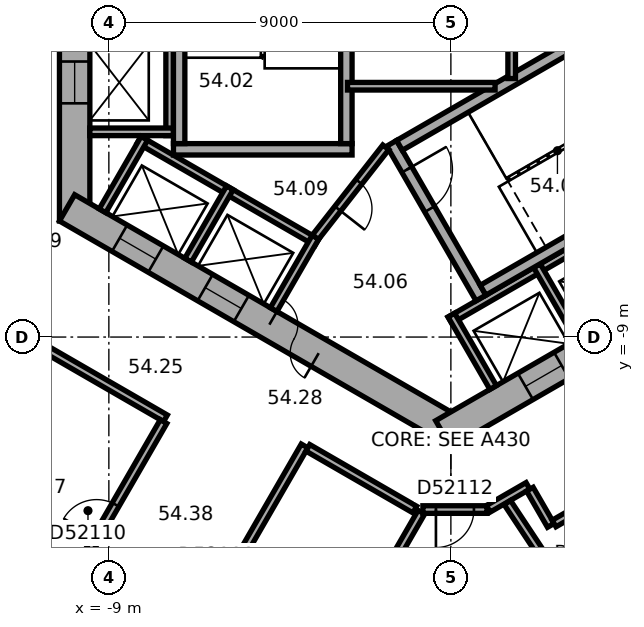
"""IFC4 building model, lengths in metres.
Left out: names, types, materials, properties, quantities, classifications, styles, units other than length and angle.
Written with IfcOpenShell. Run it as: python <this file> out.ifc"""

import sys

from ifc_helpers import new_model, si_unit, direction, frame, frame_2d, origin, place, context, subcontext, project, spatial, rectangle, extrude, element, fill, save


model = new_model("IFC4")
c1 = context("Model", 3, precision=1e-05, world=origin(), true_north=direction((0.0, 1.0)))
c2 = subcontext(c1, "Body", "Model", "MODEL_VIEW")
j1 = project(units=[si_unit("LENGTHUNIT", "METRE"), si_unit("PLANEANGLEUNIT", "RADIAN")], contexts=[c1])
p1 = place(None, origin())
s1 = spatial("IfcSite", under=j1, at=p1, CompositionType="ELEMENT")
p2 = place(p1, origin())
s2 = spatial("IfcBuilding", under=s1, at=p2, CompositionType="ELEMENT")
p3 = place(p2, frame((0.0, 0.0, 221.7)))
s3 = spatial("IfcBuildingStorey", under=s2, at=p3, CompositionType="ELEMENT", Elevation=221.7)
p4 = place(p3, frame((-9.9, 5.947, 0.0), z_axis=(0.0, 0.0, 1.0), x_axis=(0.0, -1.0, 0.0)))
e1 = element("IfcWall", 1, at=p4, inside=s3, PredefinedType="SHEAR", context=c2, shape_type="SweptSolid", body=[
    extrude(rectangle(XDim=11.894, YDim=0.8, at=frame_2d((5.947, 0.0))), origin(), (0.0, 0.0, 1.0), 3.7),
])
p5 = place(p4, frame((5.097, 0.0, 0.0)))
e2 = element("IfcOpeningElement", 2, at=p5, cuts=e1, PredefinedType="OPENING", context=c2, shape_type="SweptSolid", body=[
    extrude(rectangle(XDim=1.1, YDim=2.1, at=frame_2d((0.55, 1.05))), frame((0.0, 0.41, 0.0), z_axis=(0.0, -1.0, 0.0), x_axis=(1.0, 0.0, 0.0)), (0.0, 0.0, 1.0), 0.82),
])
p6 = place(p4, frame((7.697, 0.0, 0.0)))
e3 = element("IfcOpeningElement", 3, at=p6, cuts=e1, PredefinedType="OPENING", context=c2, shape_type="SweptSolid", body=[
    extrude(rectangle(XDim=1.1, YDim=2.1, at=frame_2d((0.55, 1.05))), frame((0.0, 0.41, 0.0), z_axis=(0.0, -1.0, 0.0), x_axis=(1.0, 0.0, 0.0)), (0.0, 0.0, 1.0), 0.82),
])
p7 = place(p3, frame((-10.1, -5.6, 0.0), z_axis=(0.0, 0.0, 1.0), x_axis=(0.866023897231, -0.500002609418, 0.0)))
e4 = element("IfcWall", 4, at=p7, inside=s3, PredefinedType="SHEAR", context=c2, shape_type="SweptSolid", body=[
    extrude(rectangle(XDim=11.894, YDim=0.8, at=frame_2d((5.947, 0.0))), origin(), (0.0, 0.0, 1.0), 3.7),
])
p8 = place(p7, frame((6.147, 0.0, 0.0)))
e5 = element("IfcOpeningElement", 5, at=p8, cuts=e4, PredefinedType="OPENING", context=c2, shape_type="SweptSolid", body=[
    extrude(rectangle(XDim=1.5, YDim=2.1, at=frame_2d((0.75, 1.05))), frame((0.0, 0.41, 0.0), z_axis=(0.0, -1.0, 0.0), x_axis=(1.0, 0.0, 0.0)), (0.0, 0.0, 1.0), 0.82),
])
p9 = place(p7, frame((1.597, 0.0, 0.0)))
e6 = element("IfcOpeningElement", 6, at=p9, cuts=e4, PredefinedType="OPENING", context=c2, shape_type="SweptSolid", body=[
    extrude(rectangle(XDim=1.1, YDim=2.1, at=frame_2d((0.55, 1.05))), frame((0.0, 0.41, 0.0), z_axis=(0.0, -1.0, 0.0), x_axis=(1.0, 0.0, 0.0)), (0.0, 0.0, 1.0), 0.82),
])
p10 = place(p7, frame((4.197, 0.0, 0.0)))
e7 = element("IfcOpeningElement", 7, at=p10, cuts=e4, PredefinedType="OPENING", context=c2, shape_type="SweptSolid", body=[
    extrude(rectangle(XDim=1.1, YDim=2.1, at=frame_2d((0.55, 1.05))), frame((0.0, 0.41, 0.0), z_axis=(0.0, -1.0, 0.0), x_axis=(1.0, 0.0, 0.0)), (0.0, 0.0, 1.0), 0.82),
])
p11 = place(p3, frame((-0.2, -11.547, 0.0), z_axis=(0.0, 0.0, 1.0), x_axis=(0.866023897231, 0.500002609418, 0.0)))
e8 = element("IfcWall", 8, at=p11, inside=s3, PredefinedType="SHEAR", context=c2, shape_type="SweptSolid", body=[
    extrude(rectangle(XDim=11.894, YDim=0.8, at=frame_2d((5.947, 0.0))), origin(), (0.0, 0.0, 1.0), 3.7),
])
p12 = place(p11, frame((2.497, 0.0, 0.0)))
e9 = element("IfcOpeningElement", 9, at=p12, cuts=e8, PredefinedType="OPENING", context=c2, shape_type="SweptSolid", body=[
    extrude(rectangle(XDim=1.1, YDim=2.1, at=frame_2d((0.55, 1.05))), frame((0.0, 0.41, 0.0), z_axis=(0.0, -1.0, 0.0), x_axis=(1.0, 0.0, 0.0)), (0.0, 0.0, 1.0), 0.82),
])
p13 = place(p11, frame((5.097, 0.0, 0.0)))
e10 = element("IfcOpeningElement", 10, at=p13, cuts=e8, PredefinedType="OPENING", context=c2, shape_type="SweptSolid", body=[
    extrude(rectangle(XDim=1.1, YDim=2.1, at=frame_2d((0.55, 1.05))), frame((0.0, 0.41, 0.0), z_axis=(0.0, -1.0, 0.0), x_axis=(1.0, 0.0, 0.0)), (0.0, 0.0, 1.0), 0.82),
])
p14 = place(p11, frame((7.697, 0.0, 0.0)))
e11 = element("IfcOpeningElement", 11, at=p14, cuts=e8, PredefinedType="OPENING", context=c2, shape_type="SweptSolid", body=[
    extrude(rectangle(XDim=1.1, YDim=2.1, at=frame_2d((0.55, 1.05))), frame((0.0, 0.41, 0.0), z_axis=(0.0, -1.0, 0.0), x_axis=(1.0, 0.0, 0.0)), (0.0, 0.0, 1.0), 0.82),
])
p15 = place(p3, frame((-17.664, -13.415, 0.0), z_axis=(0.0, 0.0, 1.0), x_axis=(0.866026555358, -0.49999800541, 0.0)))
e12 = element("IfcWall", 12, at=p15, inside=s3, PredefinedType="STANDARD", context=c2, shape_type="SweptSolid", body=[
    extrude(rectangle(XDim=18.841, YDim=0.2, at=frame_2d((9.421, 0.0))), origin(), (0.0, 0.0, 1.0), 3.7),
])
p16 = place(p15, frame((1.254, 0.0, 0.9)))
e13 = element("IfcOpeningElement", 13, at=p16, cuts=e12, PredefinedType="OPENING", context=c2, shape_type="SweptSolid", body=[
    extrude(rectangle(XDim=2.2, YDim=2.0, at=frame_2d((1.1, 1.0))), frame((0.0, 0.11, 0.0), z_axis=(0.0, -1.0, 0.0), x_axis=(1.0, 0.0, 0.0)), (0.0, 0.0, 1.0), 0.22),
])
p17 = place(p15, frame((4.788, 0.0, 0.9)))
e14 = element("IfcOpeningElement", 14, at=p17, cuts=e12, PredefinedType="OPENING", context=c2, shape_type="SweptSolid", body=[
    extrude(rectangle(XDim=2.2, YDim=2.0, at=frame_2d((1.1, 1.0))), frame((0.0, 0.11, 0.0), z_axis=(0.0, -1.0, 0.0), x_axis=(1.0, 0.0, 0.0)), (0.0, 0.0, 1.0), 0.22),
])
p18 = place(p15, frame((8.322, 0.0, 0.9)))
e15 = element("IfcOpeningElement", 15, at=p18, cuts=e12, PredefinedType="OPENING", context=c2, shape_type="SweptSolid", body=[
    extrude(rectangle(XDim=2.2, YDim=2.0, at=frame_2d((1.1, 1.0))), frame((0.0, 0.11, 0.0), z_axis=(0.0, -1.0, 0.0), x_axis=(1.0, 0.0, 0.0)), (0.0, 0.0, 1.0), 0.22),
])
p19 = place(p15, frame((11.855, 0.0, 0.9)))
e16 = element("IfcOpeningElement", 16, at=p19, cuts=e12, PredefinedType="OPENING", context=c2, shape_type="SweptSolid", body=[
    extrude(rectangle(XDim=2.2, YDim=2.0, at=frame_2d((1.1, 1.0))), frame((0.0, 0.11, 0.0), z_axis=(0.0, -1.0, 0.0), x_axis=(1.0, 0.0, 0.0)), (0.0, 0.0, 1.0), 0.22),
])
p20 = place(p15, frame((15.389, 0.0, 0.9)))
e17 = element("IfcOpeningElement", 17, at=p20, cuts=e12, PredefinedType="OPENING", context=c2, shape_type="SweptSolid", body=[
    extrude(rectangle(XDim=2.2, YDim=2.0, at=frame_2d((1.1, 1.0))), frame((0.0, 0.11, 0.0), z_axis=(0.0, -1.0, 0.0), x_axis=(1.0, 0.0, 0.0)), (0.0, 0.0, 1.0), 0.22),
])
p21 = place(p3, frame((2.739, -22.711, 0.0), z_axis=(0.0, 0.0, 1.0), x_axis=(0.833885723098, 0.551937134838, 0.0)))
e18 = element("IfcWall", 18, at=p21, inside=s3, PredefinedType="STANDARD", context=c2, shape_type="SweptSolid", body=[
    extrude(rectangle(XDim=18.841, YDim=0.2, at=frame_2d((9.421, 0.0))), origin(), (0.0, 0.0, 1.0), 3.7),
])
p22 = place(p21, frame((1.252, 0.0, 0.9)))
e19 = element("IfcOpeningElement", 19, at=p22, cuts=e18, PredefinedType="OPENING", context=c2, shape_type="SweptSolid", body=[
    extrude(rectangle(XDim=2.2, YDim=2.0, at=frame_2d((1.1, 1.0))), frame((0.0, 0.11, 0.0), z_axis=(0.0, -1.0, 0.0), x_axis=(1.0, 0.0, 0.0)), (0.0, 0.0, 1.0), 0.22),
])
p23 = place(p21, frame((4.786, 0.0, 0.9)))
e20 = element("IfcOpeningElement", 20, at=p23, cuts=e18, PredefinedType="OPENING", context=c2, shape_type="SweptSolid", body=[
    extrude(rectangle(XDim=2.2, YDim=2.0, at=frame_2d((1.1, 1.0))), frame((0.0, 0.11, 0.0), z_axis=(0.0, -1.0, 0.0), x_axis=(1.0, 0.0, 0.0)), (0.0, 0.0, 1.0), 0.22),
])
p24 = place(p21, frame((8.32, 0.0, 0.9)))
e21 = element("IfcOpeningElement", 21, at=p24, cuts=e18, PredefinedType="OPENING", context=c2, shape_type="SweptSolid", body=[
    extrude(rectangle(XDim=2.2, YDim=2.0, at=frame_2d((1.1, 1.0))), frame((0.0, 0.11, 0.0), z_axis=(0.0, -1.0, 0.0), x_axis=(1.0, 0.0, 0.0)), (0.0, 0.0, 1.0), 0.22),
])
p25 = place(p21, frame((11.854, 0.0, 0.9)))
e22 = element("IfcOpeningElement", 22, at=p25, cuts=e18, PredefinedType="OPENING", context=c2, shape_type="SweptSolid", body=[
    extrude(rectangle(XDim=2.2, YDim=2.0, at=frame_2d((1.1, 1.0))), frame((0.0, 0.11, 0.0), z_axis=(0.0, -1.0, 0.0), x_axis=(1.0, 0.0, 0.0)), (0.0, 0.0, 1.0), 0.22),
])
p26 = place(p21, frame((15.387, 0.0, 0.9)))
e23 = element("IfcOpeningElement", 23, at=p26, cuts=e18, PredefinedType="OPENING", context=c2, shape_type="SweptSolid", body=[
    extrude(rectangle(XDim=2.2, YDim=2.0, at=frame_2d((1.1, 1.0))), frame((0.0, 0.11, 0.0), z_axis=(0.0, -1.0, 0.0), x_axis=(1.0, 0.0, 0.0)), (0.0, 0.0, 1.0), 0.22),
])
p27 = place(p3, frame((-7.4, 4.3, 0.0), z_axis=(0.0, 0.0, 1.0), x_axis=(0.0, -1.0, 0.0)))
e24 = element("IfcWall", 24, at=p27, inside=s3, PredefinedType="PARTITIONING", context=c2, shape_type="SweptSolid", body=[
    extrude(rectangle(XDim=8.0, YDim=0.2, at=frame_2d((4.0, 0.0))), origin(), (0.0, 0.0, 1.0), 3.42),
])
p28 = place(p3, frame((-7.3, -3.6, 0.0), z_axis=(0.0, 0.0, 1.0), x_axis=(-1.0, 0.0, 0.0)))
e25 = element("IfcWall", 25, at=p28, inside=s3, PredefinedType="PARTITIONING", context=c2, shape_type="SweptSolid", body=[
    extrude(rectangle(XDim=2.2, YDim=0.2, at=frame_2d((1.1, 0.0))), origin(), (0.0, 0.0, 1.0), 3.42),
])
p29 = place(p3, frame((-8.203, -3.809, 0.0), z_axis=(0.0, 0.0, 1.0), x_axis=(0.866028230842, -0.499995103361, 0.0)))
e26 = element("IfcWall", 26, at=p29, inside=s3, PredefinedType="PARTITIONING", context=c2, shape_type="SweptSolid", body=[
    extrude(rectangle(XDim=5.4, YDim=0.2, at=frame_2d((2.7, 0.0))), origin(), (0.0, 0.0, 1.0), 3.42),
])
for number, where, z_axis, x_axis in (
    (27, (-8.067, -3.772, 0.0), (0.0, 0.0, 1.0), (-0.5, -0.866, 0.0)),
    (28, (-5.815, -5.072, 0.0), (0.0, 0.0, 1.0), (-0.5, -0.866, 0.0)),
):
    element("IfcWall", number, at=place(p3, frame(where, z_axis=z_axis, x_axis=x_axis)), inside=s3, PredefinedType="PARTITIONING", context=c2, shape_type="SweptSolid", body=[
        extrude(rectangle(XDim=2.2, YDim=0.2, at=frame_2d((1.1, 0.0))), origin(), (0.0, 0.0, 1.0), 3.42),
    ])
p30 = place(p3, frame((-3.563, -6.372, 0.0), z_axis=(0.0, 0.0, 1.0), x_axis=(-0.499994660107, -0.866028486751, 0.0)))
e29 = element("IfcWall", 29, at=p30, inside=s3, PredefinedType="PARTITIONING", context=c2, shape_type="SweptSolid", body=[
    extrude(rectangle(XDim=2.2, YDim=0.2, at=frame_2d((1.1, 0.0))), origin(), (0.0, 0.0, 1.0), 3.42),
])
p31 = place(p3, frame((-0.024, -8.559, 0.0), z_axis=(0.0, 0.0, 1.0), x_axis=(0.866026010844, 0.49999894854, 0.0)))
e30 = element("IfcWall", 30, at=p31, inside=s3, PredefinedType="PARTITIONING", context=c2, shape_type="SweptSolid", body=[
    extrude(rectangle(XDim=8.0, YDim=0.2, at=frame_2d((4.0, 0.0))), origin(), (0.0, 0.0, 1.0), 3.42),
])
for number, where, z_axis, x_axis in (
    (31, (0.013, -8.422, 0.0), (0.0, 0.0, 1.0), (0.5, -0.866, 0.0)),
    (32, (2.264, -7.122, 0.0), (0.0, 0.0, 1.0), (0.5, -0.866, 0.0)),
):
    element("IfcWall", number, at=place(p3, frame(where, z_axis=z_axis, x_axis=x_axis)), inside=s3, PredefinedType="PARTITIONING", context=c2, shape_type="SweptSolid", body=[
        extrude(rectangle(XDim=2.2, YDim=0.2, at=frame_2d((1.1, 0.0))), origin(), (0.0, 0.0, 1.0), 3.42),
    ])
p32 = place(p3, frame((-2.6, -4.06, 0.0), z_axis=(0.0, 0.0, 1.0), x_axis=(-1.0, 0.0, 0.0)))
e33 = element("IfcWall", 33, at=p32, inside=s3, PredefinedType="SHEAR", context=c2, shape_type="SweptSolid", body=[
    extrude(rectangle(XDim=4.7, YDim=0.3, at=frame_2d((2.35, 0.0))), origin(), (0.0, 0.0, 1.0), 3.42),
])
for number, where, z_axis, x_axis in (
    (34, (-2.75, 3.15, 0.0), (0.0, 0.0, 1.0), (0.0, -1.0, 0.0)),
    (35, (-7.15, 3.15, 0.0), (0.0, 0.0, 1.0), (0.0, -1.0, 0.0)),
):
    element("IfcWall", number, at=place(p3, frame(where, z_axis=z_axis, x_axis=x_axis)), inside=s3, PredefinedType="SHEAR", context=c2, shape_type="SweptSolid", body=[
        extrude(rectangle(XDim=7.06, YDim=0.3, at=frame_2d((3.53, 0.0))), origin(), (0.0, 0.0, 1.0), 3.42),
    ])
p33 = place(p3, frame((-1.558, -3.902, 0.0), z_axis=(0.0, 0.0, 1.0), x_axis=(0.499977259774, -0.866038532462, 0.0)))
e36 = element("IfcWall", 36, at=p33, inside=s3, PredefinedType="SHEAR", context=c2, shape_type="SweptSolid", body=[
    extrude(rectangle(XDim=4.7, YDim=0.3, at=frame_2d((2.35, 0.0))), origin(), (0.0, 0.0, 1.0), 3.42),
])
p34 = place(p33, frame((0.8, 0.0, 0.0)))
e37 = element("IfcOpeningElement", 37, at=p34, cuts=e36, PredefinedType="OPENING", context=c2, shape_type="SweptSolid", body=[
    extrude(rectangle(XDim=1.2, YDim=2.1, at=frame_2d((0.6, 1.05))), frame((0.0, 0.16, 0.0), z_axis=(0.0, -1.0, 0.0), x_axis=(1.0, 0.0, 0.0)), (0.0, 0.0, 1.0), 0.32),
])
for number, where, z_axis, x_axis in (
    (38, (-1.353, -3.957, 0.0), (0.0, 0.0, 1.0), (0.866, 0.5, 0.0)),
    (39, (0.847, -7.767, 0.0), (0.0, 0.0, 1.0), (0.866, 0.5, 0.0)),
):
    element("IfcWall", number, at=place(p3, frame(where, z_axis=z_axis, x_axis=x_axis)), inside=s3, PredefinedType="SHEAR", context=c2, shape_type="SweptSolid", body=[
        extrude(rectangle(XDim=7.06, YDim=0.3, at=frame_2d((3.53, 0.0))), origin(), (0.0, 0.0, 1.0), 3.42),
    ])
p35 = place(p3, frame((-1.712, -4.008, 0.0), z_axis=(0.0, 0.0, 1.0), x_axis=(-0.616549420702, -0.787316208287, 0.0)))
e40 = element("IfcWall", 40, at=p35, inside=s3, PredefinedType="PARTITIONING", context=c2, shape_type="SweptSolid", body=[
    extrude(rectangle(XDim=3.002, YDim=0.2, at=frame_2d((1.501, 0.0))), origin(), (0.0, 0.0, 1.0), 3.42),
])
p36 = place(p35, frame((1.15, 0.0, 0.0)))
e41 = element("IfcOpeningElement", 41, at=p36, cuts=e40, PredefinedType="OPENING", context=c2, shape_type="SweptSolid", body=[
    extrude(rectangle(XDim=0.9, YDim=2.1, at=frame_2d((0.45, 1.05))), frame((0.0, 0.11, 0.0), z_axis=(0.0, -1.0, 0.0), x_axis=(1.0, 0.0, 0.0)), (0.0, 0.0, 1.0), 0.22),
])
p37 = place(p3, frame((-2.72, -2.4, 0.0), z_axis=(0.0, 0.0, 1.0), x_axis=(1.0, 0.0, 0.0)))
e42 = element("IfcWall", 42, at=p37, inside=s3, PredefinedType="PARTITIONING", context=c2, shape_type="SweptSolid", body=[
    extrude(rectangle(XDim=3.883, YDim=0.2, at=frame_2d((1.941, 0.0))), origin(), (0.0, 0.0, 1.0), 3.42),
])
p38 = place(p3, frame((1.6, -2.198, 0.0), z_axis=(0.0, 0.0, 1.0), x_axis=(0.0, 1.0, 0.0)))
e43 = element("IfcWall", 43, at=p38, inside=s3, PredefinedType="PARTITIONING", context=c2, shape_type="SweptSolid", body=[
    extrude(rectangle(XDim=4.397, YDim=0.2, at=frame_2d((2.198, 0.0))), origin(), (0.0, 0.0, 1.0), 3.42),
])
p39 = place(p3, frame((-11.551, -8.805, 0.0), z_axis=(0.0, 0.0, 1.0), x_axis=(0.866038310922, -0.499977643516, 0.0)))
e44 = element("IfcWall", 44, at=p39, inside=s3, PredefinedType="PARTITIONING", context=c2, shape_type="SweptSolid", body=[
    extrude(rectangle(XDim=4.665, YDim=0.2, at=frame_2d((2.333, 0.0))), origin(), (0.0, 0.0, 1.0), 3.42),
])
p40 = place(p3, frame((-10.585, -16.463, 0.0), z_axis=(0.0, 0.0, 1.0), x_axis=(0.499993802756, 0.866028981735, 0.0)))
e45 = element("IfcWall", 45, at=p40, inside=s3, PredefinedType="PARTITIONING", context=c2, shape_type="SweptSolid", body=[
    extrude(rectangle(XDim=6.049, YDim=0.2, at=frame_2d((3.024, 0.0))), origin(), (0.0, 0.0, 1.0), 2.87),
])
p41 = place(p40, frame((2.524, 0.0, 0.0)))
e46 = element("IfcOpeningElement", 46, at=p41, cuts=e45, PredefinedType="OPENING", context=c2, shape_type="SweptSolid", body=[
    extrude(rectangle(XDim=1.0, YDim=2.1, at=frame_2d((0.5, 1.05))), frame((0.0, 0.11, 0.0), z_axis=(0.0, -1.0, 0.0), x_axis=(1.0, 0.0, 0.0)), (0.0, 0.0, 1.0), 0.22),
])
p42 = place(p3, frame((-7.525, -18.23, 0.0), z_axis=(0.0, 0.0, 1.0), x_axis=(0.499983153418, 0.866035129944, 0.0)))
e47 = element("IfcWall", 47, at=p42, inside=s3, PredefinedType="PARTITIONING", context=c2, shape_type="SweptSolid", body=[
    extrude(rectangle(XDim=7.35, YDim=0.2, at=frame_2d((3.675, 0.0))), origin(), (0.0, 0.0, 1.0), 3.42),
])
p43 = place(p42, frame((3.175, 0.0, 0.0)))
e48 = element("IfcOpeningElement", 48, at=p43, cuts=e47, PredefinedType="OPENING", context=c2, shape_type="SweptSolid", body=[
    extrude(rectangle(XDim=1.0, YDim=2.1, at=frame_2d((0.5, 1.05))), frame((0.0, 0.11, 0.0), z_axis=(0.0, -1.0, 0.0), x_axis=(1.0, 0.0, 0.0)), (0.0, 0.0, 1.0), 0.22),
])
p44 = place(p3, frame((-4.465, -19.997, 0.0), z_axis=(0.0, 0.0, 1.0), x_axis=(0.500011802906, 0.866018589266, 0.0)))
e49 = element("IfcWall", 49, at=p44, inside=s3, PredefinedType="PARTITIONING", context=c2, shape_type="SweptSolid", body=[
    extrude(rectangle(XDim=7.377, YDim=0.2, at=frame_2d((3.688, 0.0))), origin(), (0.0, 0.0, 1.0), 3.42),
])
p45 = place(p3, frame((-3.763, -11.915, 0.0), z_axis=(0.0, 0.0, 1.0), x_axis=(0.866037915695, -0.499978328108, 0.0)))
e50 = element("IfcWall", 50, at=p45, inside=s3, PredefinedType="PARTITIONING", context=c2, shape_type="SweptSolid", body=[
    extrude(rectangle(XDim=3.249, YDim=0.2, at=frame_2d((1.625, 0.0))), origin(), (0.0, 0.0, 1.0), 3.42),
])
p46 = place(p3, frame((-0.736, -13.539, 0.0), z_axis=(0.0, 0.0, 1.0), x_axis=(1.0, 0.0, 0.0)))
e51 = element("IfcWall", 51, at=p46, inside=s3, PredefinedType="PARTITIONING", context=c2, shape_type="SweptSolid", body=[
    extrude(rectangle(XDim=1.686, YDim=0.2, at=frame_2d((0.843, 0.0))), origin(), (0.0, 0.0, 1.0), 3.42),
])
p47 = place(p46, frame((0.343, 0.0, 0.0)))
e52 = element("IfcOpeningElement", 52, at=p47, cuts=e51, PredefinedType="OPENING", context=c2, shape_type="SweptSolid", body=[
    extrude(rectangle(XDim=1.0, YDim=2.1, at=frame_2d((0.5, 1.05))), frame((0.0, 0.11, 0.0), z_axis=(0.0, -1.0, 0.0), x_axis=(1.0, 0.0, 0.0)), (0.0, 0.0, 1.0), 0.22),
])
p48 = place(p3, frame((0.985, -13.519, 0.0), z_axis=(0.0, 0.0, 1.0), x_axis=(0.866054082991, 0.499950322867, 0.0)))
e53 = element("IfcWall", 53, at=p48, inside=s3, PredefinedType="PARTITIONING", context=c2, shape_type="SweptSolid", body=[
    extrude(rectangle(XDim=1.206, YDim=0.2, at=frame_2d((0.603, 0.0))), origin(), (0.0, 0.0, 1.0), 3.42),
])
p49 = place(p3, frame((2.079, -13.003, 0.0), z_axis=(0.0, 0.0, 1.0), x_axis=(0.500074377092, -0.865982457891, 0.0)))
e54 = element("IfcWall", 54, at=p49, inside=s3, PredefinedType="PARTITIONING", context=c2, shape_type="SweptSolid", body=[
    extrude(rectangle(XDim=1.101, YDim=0.2, at=frame_2d((0.55, 0.0))), origin(), (0.0, 0.0, 1.0), 3.42),
])
p50 = place(p3, frame((2.716, -13.906, 0.0), z_axis=(0.0, 0.0, 1.0), x_axis=(0.866040290674, 0.499974214264, 0.0)))
e55 = element("IfcWall", 55, at=p50, inside=s3, PredefinedType="PARTITIONING", context=c2, shape_type="SweptSolid", body=[
    extrude(rectangle(XDim=8.702, YDim=0.2, at=frame_2d((4.351, 0.0))), origin(), (0.0, 0.0, 1.0), 3.42),
])
p51 = place(p50, frame((2.679, 0.0, 0.0)))
e56 = element("IfcOpeningElement", 56, at=p51, cuts=e55, PredefinedType="OPENING", context=c2, shape_type="SweptSolid", body=[
    extrude(rectangle(XDim=1.0, YDim=2.1, at=frame_2d((0.5, 1.05))), frame((0.0, 0.11, 0.0), z_axis=(0.0, -1.0, 0.0), x_axis=(1.0, 0.0, 0.0)), (0.0, 0.0, 1.0), 0.22),
])
p52 = place(p3, frame((5.677, -19.687, 0.0), z_axis=(0.0, 0.0, 1.0), x_axis=(-0.551936619203, 0.833886064389, 0.0)))
e57 = element("IfcWall", 57, at=p52, inside=s3, PredefinedType="PARTITIONING", context=c2, shape_type="SweptSolid", body=[
    extrude(rectangle(XDim=7.592, YDim=0.2, at=frame_2d((3.796, 0.0))), origin(), (0.0, 0.0, 1.0), 3.42),
])
p53 = place(p8, origin())
e58 = element("IfcDoor", 58, at=p53, inside=s3, OperationType="DOUBLE_DOOR_SINGLE_SWING", PredefinedType="DOOR", context=c2, shape_type="SweptSolid", body=[
    extrude(rectangle(XDim=1.5, YDim=2.1, at=frame_2d((0.75, 1.05))), frame((0.0, 0.025, 0.0), z_axis=(0.0, -1.0, 0.0), x_axis=(1.0, 0.0, 0.0)), (0.0, 0.0, 1.0), 0.05),
])
fill(e5, e58)
p54 = place(p34, origin())
e59 = element("IfcDoor", 59, at=p54, inside=s3, OperationType="SINGLE_SWING_RIGHT", PredefinedType="DOOR", context=c2, shape_type="SweptSolid", body=[
    extrude(rectangle(XDim=1.2, YDim=2.1, at=frame_2d((0.6, 1.05))), frame((0.0, 0.025, 0.0), z_axis=(0.0, -1.0, 0.0), x_axis=(1.0, 0.0, 0.0)), (0.0, 0.0, 1.0), 0.05),
])
fill(e37, e59)
p55 = place(p36, origin())
e60 = element("IfcDoor", 60, at=p55, inside=s3, OperationType="SINGLE_SWING_LEFT", PredefinedType="DOOR", context=c2, shape_type="SweptSolid", body=[
    extrude(rectangle(XDim=0.9, YDim=2.1, at=frame_2d((0.45, 1.05))), frame((0.0, 0.025, 0.0), z_axis=(0.0, -1.0, 0.0), x_axis=(1.0, 0.0, 0.0)), (0.0, 0.0, 1.0), 0.05),
])
fill(e41, e60)
p56 = place(p6, origin())
e61 = element("IfcDoor", 61, at=p56, inside=s3, OperationType="DOUBLE_DOOR_SLIDING", PredefinedType="DOOR", context=c2, shape_type="SweptSolid", body=[
    extrude(rectangle(XDim=1.1, YDim=2.1, at=frame_2d((0.55, 1.05))), frame((0.0, 0.025, 0.0), z_axis=(0.0, -1.0, 0.0), x_axis=(1.0, 0.0, 0.0)), (0.0, 0.0, 1.0), 0.05),
])
fill(e3, e61)
p57 = place(p9, origin())
e62 = element("IfcDoor", 62, at=p57, inside=s3, OperationType="DOUBLE_DOOR_SLIDING", PredefinedType="DOOR", context=c2, shape_type="SweptSolid", body=[
    extrude(rectangle(XDim=1.1, YDim=2.1, at=frame_2d((0.55, 1.05))), frame((0.0, 0.025, 0.0), z_axis=(0.0, -1.0, 0.0), x_axis=(1.0, 0.0, 0.0)), (0.0, 0.0, 1.0), 0.05),
])
fill(e6, e62)
p58 = place(p10, origin())
e63 = element("IfcDoor", 63, at=p58, inside=s3, OperationType="DOUBLE_DOOR_SLIDING", PredefinedType="DOOR", context=c2, shape_type="SweptSolid", body=[
    extrude(rectangle(XDim=1.1, YDim=2.1, at=frame_2d((0.55, 1.05))), frame((0.0, 0.025, 0.0), z_axis=(0.0, -1.0, 0.0), x_axis=(1.0, 0.0, 0.0)), (0.0, 0.0, 1.0), 0.05),
])
fill(e7, e63)
p59 = place(p12, origin())
e64 = element("IfcDoor", 64, at=p59, inside=s3, OperationType="DOUBLE_DOOR_SLIDING", PredefinedType="DOOR", context=c2, shape_type="SweptSolid", body=[
    extrude(rectangle(XDim=1.1, YDim=2.1, at=frame_2d((0.55, 1.05))), frame((0.0, 0.025, 0.0), z_axis=(0.0, -1.0, 0.0), x_axis=(1.0, 0.0, 0.0)), (0.0, 0.0, 1.0), 0.05),
])
fill(e9, e64)
p60 = place(p41, origin())
e65 = element("IfcDoor", 65, at=p60, inside=s3, OperationType="SINGLE_SWING_LEFT", PredefinedType="DOOR", context=c2, shape_type="SweptSolid", body=[
    extrude(rectangle(XDim=1.0, YDim=2.1, at=frame_2d((0.5, 1.05))), frame((0.0, 0.025, 0.0), z_axis=(0.0, -1.0, 0.0), x_axis=(1.0, 0.0, 0.0)), (0.0, 0.0, 1.0), 0.05),
])
fill(e46, e65)
p61 = place(p47, origin())
e66 = element("IfcDoor", 66, at=p61, inside=s3, OperationType="SINGLE_SWING_LEFT", PredefinedType="DOOR", context=c2, shape_type="SweptSolid", body=[
    extrude(rectangle(XDim=1.0, YDim=2.1, at=frame_2d((0.5, 1.05))), frame((0.0, 0.025, 0.0), z_axis=(0.0, -1.0, 0.0), x_axis=(1.0, 0.0, 0.0)), (0.0, 0.0, 1.0), 0.05),
])
fill(e52, e66)
save(model, sys.argv[1])
